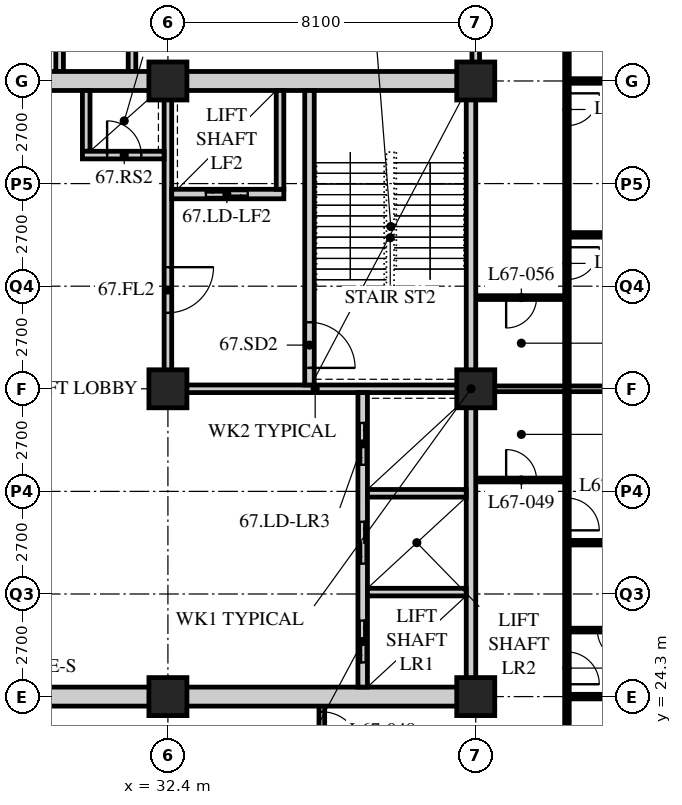
"""IFC4 building model, lengths in metres.
Left out: names, types, materials, properties, quantities, classifications, styles, units other than length and angle.
Written with IfcOpenShell. Run it as: python <this file> out.ifc"""

import sys

from ifc_helpers import new_model, si_unit, direction, frame, frame_2d, origin, origin_2d, place, context, subcontext, project, spatial, rectangle, hollow_rectangle, extrude, element, fill, save


model = new_model("IFC4")
c1 = context("Model", 3, precision=1e-05, world=origin(), true_north=direction((0.0, 1.0)))
c2 = subcontext(c1, "Body", "Model", "MODEL_VIEW")
j1 = project(units=[si_unit("LENGTHUNIT", "METRE"), si_unit("PLANEANGLEUNIT", "RADIAN")], contexts=[c1])
p1 = place(None, origin())
s1 = spatial("IfcSite", under=j1, at=p1, CompositionType="ELEMENT")
p2 = place(p1, origin())
s2 = spatial("IfcBuilding", under=s1, at=p2, CompositionType="ELEMENT")
p3 = place(p2, frame((0.0, 0.0, 261.9)))
s3 = spatial("IfcBuildingStorey", under=s2, at=p3, CompositionType="ELEMENT", Elevation=261.9)
for number, where, z_axis, x_axis in (
    (1, (32.4, 24.3, 0.0), (0.0, 0.0, 1.0), (1.0, 0.0, 0.0)),
    (2, (32.4, 32.4, 0.0), (0.0, 0.0, 1.0), (1.0, 0.0, 0.0)),
    (3, (32.4, 40.5, 0.0), (0.0, 0.0, 1.0), (1.0, 0.0, 0.0)),
    (4, (40.5, 24.3, 0.0), (0.0, 0.0, 1.0), (1.0, 0.0, 0.0)),
    (5, (40.5, 32.4, 0.0), (0.0, 0.0, 1.0), (1.0, 0.0, 0.0)),
    (6, (40.5, 40.5, 0.0), (0.0, 0.0, 1.0), (1.0, 0.0, 0.0)),
):
    element("IfcColumn", number, at=place(p3, frame(where, z_axis=z_axis, x_axis=x_axis)), inside=s3, PredefinedType="COLUMN", context=c2, shape_type="SweptSolid", body=[
        extrude(hollow_rectangle(XDim=1.0, YDim=1.0, WallThickness=0.1, at=origin_2d()), origin(), (0.0, 0.0, 1.0), 3.9),
    ])
for number, where, z_axis, x_axis in (
    (7, (31.455, 46.8, 0.0), (0.0, 0.0, 1.0), (0.0, -1.0, 0.0)),
    (8, (29.55, 40.5, 0.0), (0.0, 0.0, 1.0), (0.0, 1.0, 0.0)),
):
    element("IfcWall", number, at=place(p3, frame(where, z_axis=z_axis, x_axis=x_axis)), inside=s3, PredefinedType="SOLIDWALL", context=c2, shape_type="SweptSolid", body=[
        extrude(rectangle(XDim=6.3, YDim=0.2, at=frame_2d((3.15, 0.0))), origin(), (0.0, 0.0, 1.0), 3.69),
    ])
p4 = place(p3, frame((36.45, 22.5, 0.0), z_axis=(0.0, 0.0, 1.0), x_axis=(0.0, 1.0, 0.0)))
e9 = element("IfcWall", 9, at=p4, inside=s3, PredefinedType="PARTITIONING", context=c2, shape_type="SweptSolid", body=[
    extrude(rectangle(XDim=1.8, YDim=0.15, at=frame_2d((0.9, 0.0))), origin(), (0.0, 0.0, 1.0), 3.69),
])
p5 = place(p4, frame((0.4, 0.0, 0.0)))
e10 = element("IfcOpeningElement", 10, at=p5, cuts=e9, PredefinedType="OPENING", context=c2, shape_type="SweptSolid", body=[
    extrude(rectangle(XDim=1.0, YDim=2.1, at=frame_2d((0.5, 1.05))), frame((0.0, 0.085, 0.0), z_axis=(0.0, -1.0, 0.0), x_axis=(1.0, 0.0, 0.0)), (0.0, 0.0, 1.0), 0.17),
])
p6 = place(p3, frame((40.5, 40.5, 0.0), z_axis=(0.0, 0.0, 1.0), x_axis=(0.0, 1.0, 0.0)))
e11 = element("IfcWall", 11, at=p6, inside=s3, PredefinedType="SOLIDWALL", context=c2, shape_type="SweptSolid", body=[
    extrude(rectangle(XDim=6.3, YDim=0.2, at=frame_2d((3.15, 0.0))), origin(), (0.0, 0.0, 1.0), 3.078),
])
p7 = place(p3, frame((40.5, 30.0, 0.0), z_axis=(0.0, 0.0, 1.0), x_axis=(1.0, 0.0, 0.0)))
e12 = element("IfcWall", 12, at=p7, inside=s3, PredefinedType="PARTITIONING", context=c2, shape_type="SweptSolid", body=[
    extrude(rectangle(XDim=2.4, YDim=0.1, at=frame_2d((1.2, 0.0))), origin(), (0.0, 0.0, 1.0), 3.69),
])
p8 = place(p7, frame((0.8, 0.0, 0.0)))
e13 = element("IfcOpeningElement", 13, at=p8, cuts=e12, PredefinedType="OPENING", context=c2, shape_type="SweptSolid", body=[
    extrude(rectangle(XDim=0.8, YDim=2.1, at=frame_2d((0.4, 1.05))), frame((0.0, 0.06, 0.0), z_axis=(0.0, -1.0, 0.0), x_axis=(1.0, 0.0, 0.0)), (0.0, 0.0, 1.0), 0.12),
])
p9 = place(p3, frame((42.9, 22.5, 0.0), z_axis=(0.0, 0.0, 1.0), x_axis=(0.0, 1.0, 0.0)))
e14 = element("IfcWall", 14, at=p9, inside=s3, PredefinedType="PARTITIONING", context=c2, shape_type="SweptSolid", body=[
    extrude(rectangle(XDim=9.9, YDim=0.12, at=frame_2d((4.95, 0.0))), origin(), (0.0, 0.0, 1.0), 3.69),
])
p10 = place(p9, frame((2.125, 0.0, 0.0)))
e15 = element("IfcOpeningElement", 15, at=p10, cuts=e14, PredefinedType="OPENING", context=c2, shape_type="SweptSolid", body=[
    extrude(rectangle(XDim=0.85, YDim=2.1, at=frame_2d((0.425, 1.05))), frame((0.0, 0.07, 0.0), z_axis=(0.0, -1.0, 0.0), x_axis=(1.0, 0.0, 0.0)), (0.0, 0.0, 1.0), 0.14),
])
p11 = place(p9, frame((6.175, 0.0, 0.0)))
e16 = element("IfcOpeningElement", 16, at=p11, cuts=e14, PredefinedType="OPENING", context=c2, shape_type="SweptSolid", body=[
    extrude(rectangle(XDim=0.85, YDim=2.1, at=frame_2d((0.425, 1.05))), frame((0.0, 0.07, 0.0), z_axis=(0.0, -1.0, 0.0), x_axis=(1.0, 0.0, 0.0)), (0.0, 0.0, 1.0), 0.14),
])
p12 = place(p3, frame((42.9, 24.3, 0.0), z_axis=(0.0, 0.0, 1.0), x_axis=(1.0, 0.0, 0.0)))
e17 = element("IfcWall", 17, at=p12, inside=s3, PredefinedType="PARTITIONING", context=c2, shape_type="SweptSolid", body=[
    extrude(rectangle(XDim=9.45, YDim=0.12, at=frame_2d((4.725, 0.0))), origin(), (0.0, 0.0, 1.0), 3.078),
])
p13 = place(p3, frame((40.5, 32.4, 0.0), z_axis=(0.0, 0.0, 1.0), x_axis=(1.0, 0.0, 0.0)))
e18 = element("IfcWall", 18, at=p13, inside=s3, PredefinedType="PARTITIONING", context=c2, shape_type="SweptSolid", body=[
    extrude(rectangle(XDim=15.9, YDim=0.15, at=frame_2d((7.95, 0.0))), origin(), (0.0, 0.0, 1.0), 3.078),
])
p14 = place(p3, frame((42.9, 26.05, 0.0), z_axis=(0.0, 0.0, 1.0), x_axis=(1.0, 0.0, 0.0)))
e19 = element("IfcWall", 19, at=p14, inside=s3, PredefinedType="PARTITIONING", context=c2, shape_type="SweptSolid", body=[
    extrude(rectangle(XDim=2.4, YDim=0.1, at=frame_2d((1.2, 0.0))), origin(), (0.0, 0.0, 1.0), 3.69),
])
p15 = place(p14, frame((0.8, 0.0, 0.0)))
e20 = element("IfcOpeningElement", 20, at=p15, cuts=e19, PredefinedType="OPENING", context=c2, shape_type="SweptSolid", body=[
    extrude(rectangle(XDim=0.8, YDim=2.1, at=frame_2d((0.4, 1.05))), frame((0.0, 0.06, 0.0), z_axis=(0.0, -1.0, 0.0), x_axis=(1.0, 0.0, 0.0)), (0.0, 0.0, 1.0), 0.12),
])
p16 = place(p3, frame((42.9, 28.35, 0.0), z_axis=(0.0, 0.0, 1.0), x_axis=(1.0, 0.0, 0.0)))
e21 = element("IfcWall", 21, at=p16, inside=s3, PredefinedType="PARTITIONING", context=c2, shape_type="SweptSolid", body=[
    extrude(rectangle(XDim=13.5, YDim=0.12, at=frame_2d((6.75, 0.0))), origin(), (0.0, 0.0, 1.0), 3.69),
])
p17 = place(p3, frame((40.5, 34.8, 0.0), z_axis=(0.0, 0.0, 1.0), x_axis=(1.0, 0.0, 0.0)))
e22 = element("IfcWall", 22, at=p17, inside=s3, PredefinedType="PARTITIONING", context=c2, shape_type="SweptSolid", body=[
    extrude(rectangle(XDim=2.4, YDim=0.1, at=frame_2d((1.2, 0.0))), origin(), (0.0, 0.0, 1.0), 3.69),
])
p18 = place(p17, frame((0.8, 0.0, 0.0)))
e23 = element("IfcOpeningElement", 23, at=p18, cuts=e22, PredefinedType="OPENING", context=c2, shape_type="SweptSolid", body=[
    extrude(rectangle(XDim=0.8, YDim=2.1, at=frame_2d((0.4, 1.05))), frame((0.0, 0.06, 0.0), z_axis=(0.0, -1.0, 0.0), x_axis=(1.0, 0.0, 0.0)), (0.0, 0.0, 1.0), 0.12),
])
p19 = place(p3, frame((42.9, 48.6, 0.0), z_axis=(0.0, 0.0, 1.0), x_axis=(0.0, -1.0, 0.0)))
e24 = element("IfcWall", 24, at=p19, inside=s3, PredefinedType="PARTITIONING", context=c2, shape_type="SweptSolid", body=[
    extrude(rectangle(XDim=16.2, YDim=0.12, at=frame_2d((8.1, 0.0))), origin(), (0.0, 0.0, 1.0), 3.69),
])
p20 = place(p19, frame((2.125, 0.0, 0.0)))
e25 = element("IfcOpeningElement", 25, at=p20, cuts=e24, PredefinedType="OPENING", context=c2, shape_type="SweptSolid", body=[
    extrude(rectangle(XDim=0.85, YDim=2.1, at=frame_2d((0.425, 1.05))), frame((0.0, 0.07, 0.0), z_axis=(0.0, -1.0, 0.0), x_axis=(1.0, 0.0, 0.0)), (0.0, 0.0, 1.0), 0.14),
])
p21 = place(p19, frame((8.425, 0.0, 0.0)))
e26 = element("IfcOpeningElement", 26, at=p21, cuts=e24, PredefinedType="OPENING", context=c2, shape_type="SweptSolid", body=[
    extrude(rectangle(XDim=0.85, YDim=2.1, at=frame_2d((0.425, 1.05))), frame((0.0, 0.07, 0.0), z_axis=(0.0, -1.0, 0.0), x_axis=(1.0, 0.0, 0.0)), (0.0, 0.0, 1.0), 0.14),
])
p22 = place(p19, frame((12.475, 0.0, 0.0)))
e27 = element("IfcOpeningElement", 27, at=p22, cuts=e24, PredefinedType="OPENING", context=c2, shape_type="SweptSolid", body=[
    extrude(rectangle(XDim=0.85, YDim=2.1, at=frame_2d((0.425, 1.05))), frame((0.0, 0.07, 0.0), z_axis=(0.0, -1.0, 0.0), x_axis=(1.0, 0.0, 0.0)), (0.0, 0.0, 1.0), 0.14),
])
p23 = place(p3, frame((42.9, 40.5, 0.0), z_axis=(0.0, 0.0, 1.0), x_axis=(1.0, 0.0, 0.0)))
e28 = element("IfcWall", 28, at=p23, inside=s3, PredefinedType="PARTITIONING", context=c2, shape_type="SweptSolid", body=[
    extrude(rectangle(XDim=13.5, YDim=0.12, at=frame_2d((6.75, 0.0))), origin(), (0.0, 0.0, 1.0), 3.078),
])
p24 = place(p3, frame((42.9, 36.45, 0.0), z_axis=(0.0, 0.0, 1.0), x_axis=(1.0, 0.0, 0.0)))
e29 = element("IfcWall", 29, at=p24, inside=s3, PredefinedType="PARTITIONING", context=c2, shape_type="SweptSolid", body=[
    extrude(rectangle(XDim=13.5, YDim=0.12, at=frame_2d((6.75, 0.0))), origin(), (0.0, 0.0, 1.0), 3.69),
])
p25 = place(p3, frame((15.95, 24.3, 0.0), z_axis=(0.0, 0.0, 1.0), x_axis=(1.0, 0.0, 0.0)))
e30 = element("IfcWall", 30, at=p25, inside=s3, PredefinedType="SOLIDWALL", context=c2, shape_type="SweptSolid", body=[
    extrude(rectangle(XDim=24.55, YDim=0.5, at=frame_2d((12.275, 0.0))), origin(), (0.0, 0.0, 1.0), 3.04),
])
p26 = place(p25, frame((11.5, 0.0, 0.0)))
e31 = element("IfcOpeningElement", 31, at=p26, cuts=e30, PredefinedType="OPENING", context=c2, shape_type="SweptSolid", body=[
    extrude(rectangle(XDim=1.8, YDim=2.4, at=frame_2d((0.9, 1.2))), frame((0.0, 0.26, 0.0), z_axis=(0.0, -1.0, 0.0), x_axis=(1.0, 0.0, 0.0)), (0.0, 0.0, 1.0), 0.52),
])
p27 = place(p3, frame((15.95, 40.5, 0.0), z_axis=(0.0, 0.0, 1.0), x_axis=(1.0, 0.0, 0.0)))
e32 = element("IfcWall", 32, at=p27, inside=s3, PredefinedType="SOLIDWALL", context=c2, shape_type="SweptSolid", body=[
    extrude(rectangle(XDim=24.55, YDim=0.5, at=frame_2d((12.275, 0.0))), origin(), (0.0, 0.0, 1.0), 3.04),
])
p28 = place(p27, frame((11.5, 0.0, 0.0)))
e33 = element("IfcOpeningElement", 33, at=p28, cuts=e32, PredefinedType="OPENING", context=c2, shape_type="SweptSolid", body=[
    extrude(rectangle(XDim=1.8, YDim=2.4, at=frame_2d((0.9, 1.2))), frame((0.0, 0.26, 0.0), z_axis=(0.0, -1.0, 0.0), x_axis=(1.0, 0.0, 0.0)), (0.0, 0.0, 1.0), 0.52),
])
p29 = place(p3, frame((40.375, 24.55, 0.0), z_axis=(0.0, 0.0, 1.0), x_axis=(0.0, 1.0, 0.0)))
e34 = element("IfcWall", 34, at=p29, inside=s3, PredefinedType="SOLIDWALL", context=c2, shape_type="SweptSolid", body=[
    extrude(rectangle(XDim=15.7, YDim=0.25, at=frame_2d((7.85, 0.0))), origin(), (0.0, 0.0, 1.0), 3.078),
])
p30 = place(p3, frame((32.3, 32.4, 0.0), z_axis=(0.0, 0.0, 1.0), x_axis=(1.0, 0.0, 0.0)))
e35 = element("IfcWall", 35, at=p30, inside=s3, PredefinedType="SOLIDWALL", context=c2, shape_type="SweptSolid", body=[
    extrude(rectangle(XDim=7.95, YDim=0.2, at=frame_2d((3.975, 0.0))), origin(), (0.0, 0.0, 1.0), 3.078),
])
p31 = place(p3, frame((32.4, 32.5, 0.0), z_axis=(0.0, 0.0, 1.0), x_axis=(0.0, 1.0, 0.0)))
e36 = element("IfcWall", 36, at=p31, inside=s3, PredefinedType="SOLIDWALL", context=c2, shape_type="SweptSolid", body=[
    extrude(rectangle(XDim=7.75, YDim=0.2, at=frame_2d((3.875, 0.0))), origin(), (0.0, 0.0, 1.0), 3.078),
])
p32 = place(p31, frame((1.9, 0.0, 0.0)))
e37 = element("IfcOpeningElement", 37, at=p32, cuts=e36, PredefinedType="OPENING", context=c2, shape_type="SweptSolid", body=[
    extrude(rectangle(XDim=1.2, YDim=2.1, at=frame_2d((0.6, 1.05))), frame((0.0, 0.11, 0.0), z_axis=(0.0, -1.0, 0.0), x_axis=(1.0, 0.0, 0.0)), (0.0, 0.0, 1.0), 0.22),
])
p33 = place(p3, frame((37.525, 24.55, 0.0), z_axis=(0.0, 0.0, 1.0), x_axis=(0.0, 1.0, 0.0)))
e38 = element("IfcWall", 38, at=p33, inside=s3, PredefinedType="SOLIDWALL", context=c2, shape_type="SweptSolid", body=[
    extrude(rectangle(XDim=7.75, YDim=0.25, at=frame_2d((3.875, 0.0))), origin(), (0.0, 0.0, 1.0), 3.69),
])
p34 = place(p33, frame((0.65, 0.0, 0.0)))
e39 = element("IfcOpeningElement", 39, at=p34, cuts=e38, PredefinedType="OPENING", context=c2, shape_type="SweptSolid", body=[
    extrude(rectangle(XDim=1.1, YDim=2.4, at=frame_2d((0.55, 1.2))), frame((0.0, 0.135, 0.0), z_axis=(0.0, -1.0, 0.0), x_axis=(1.0, 0.0, 0.0)), (0.0, 0.0, 1.0), 0.27),
])
p35 = place(p33, frame((3.25, 0.0, 0.0)))
e40 = element("IfcOpeningElement", 40, at=p35, cuts=e38, PredefinedType="OPENING", context=c2, shape_type="SweptSolid", body=[
    extrude(rectangle(XDim=1.1, YDim=2.4, at=frame_2d((0.55, 1.2))), frame((0.0, 0.135, 0.0), z_axis=(0.0, -1.0, 0.0), x_axis=(1.0, 0.0, 0.0)), (0.0, 0.0, 1.0), 0.27),
])
p36 = place(p33, frame((5.85, 0.0, 0.0)))
e41 = element("IfcOpeningElement", 41, at=p36, cuts=e38, PredefinedType="OPENING", context=c2, shape_type="SweptSolid", body=[
    extrude(rectangle(XDim=1.1, YDim=2.4, at=frame_2d((0.55, 1.2))), frame((0.0, 0.135, 0.0), z_axis=(0.0, -1.0, 0.0), x_axis=(1.0, 0.0, 0.0)), (0.0, 0.0, 1.0), 0.27),
])
for number, where, z_axis, x_axis in (
    (42, (37.65, 27.05, 0.0), (0.0, 0.0, 1.0), (1.0, 0.0, 0.0)),
    (43, (37.65, 29.65, 0.0), (0.0, 0.0, 1.0), (1.0, 0.0, 0.0)),
):
    element("IfcWall", number, at=place(p3, frame(where, z_axis=z_axis, x_axis=x_axis)), inside=s3, PredefinedType="SOLIDWALL", context=c2, shape_type="SweptSolid", body=[
        extrude(rectangle(XDim=2.6, YDim=0.2, at=frame_2d((1.3, 0.0))), origin(), (0.0, 0.0, 1.0), 3.69),
    ])
p37 = place(p3, frame((36.125, 32.5, 0.0), z_axis=(0.0, 0.0, 1.0), x_axis=(0.0, 1.0, 0.0)))
e44 = element("IfcWall", 44, at=p37, inside=s3, PredefinedType="SOLIDWALL", context=c2, shape_type="SweptSolid", body=[
    extrude(rectangle(XDim=7.75, YDim=0.25, at=frame_2d((3.875, 0.0))), origin(), (0.0, 0.0, 1.0), 3.69),
])
p38 = place(p37, frame((0.45, 0.0, 0.0)))
e45 = element("IfcOpeningElement", 45, at=p38, cuts=e44, PredefinedType="OPENING", context=c2, shape_type="SweptSolid", body=[
    extrude(rectangle(XDim=1.2, YDim=2.1, at=frame_2d((0.6, 1.05))), frame((0.0, 0.135, 0.0), z_axis=(0.0, -1.0, 0.0), x_axis=(1.0, 0.0, 0.0)), (0.0, 0.0, 1.0), 0.27),
])
p39 = place(p3, frame((32.5, 37.525, 0.0), z_axis=(0.0, 0.0, 1.0), x_axis=(1.0, 0.0, 0.0)))
e46 = element("IfcWall", 46, at=p39, inside=s3, PredefinedType="SOLIDWALL", context=c2, shape_type="SweptSolid", body=[
    extrude(rectangle(XDim=2.95, YDim=0.25, at=frame_2d((1.475, 0.0))), origin(), (0.0, 0.0, 1.0), 3.69),
])
p40 = place(p39, frame((0.9, 0.0, 0.0)))
e47 = element("IfcOpeningElement", 47, at=p40, cuts=e46, PredefinedType="OPENING", context=c2, shape_type="SweptSolid", body=[
    extrude(rectangle(XDim=1.1, YDim=2.4, at=frame_2d((0.55, 1.2))), frame((0.0, 0.135, 0.0), z_axis=(0.0, -1.0, 0.0), x_axis=(1.0, 0.0, 0.0)), (0.0, 0.0, 1.0), 0.27),
])
p41 = place(p3, frame((35.35, 37.65, 0.0), z_axis=(0.0, 0.0, 1.0), x_axis=(0.0, 1.0, 0.0)))
e48 = element("IfcWall", 48, at=p41, inside=s3, PredefinedType="SOLIDWALL", context=c2, shape_type="SweptSolid", body=[
    extrude(rectangle(XDim=2.6, YDim=0.2, at=frame_2d((1.3, 0.0))), origin(), (0.0, 0.0, 1.0), 3.69),
])
p42 = place(p3, frame((30.25, 38.65, 0.0), z_axis=(0.0, 0.0, 1.0), x_axis=(0.0, 1.0, 0.0)))
e49 = element("IfcWall", 49, at=p42, inside=s3, PredefinedType="SOLIDWALL", context=c2, shape_type="SweptSolid", body=[
    extrude(rectangle(XDim=1.6, YDim=0.2, at=frame_2d((0.8, 0.0))), origin(), (0.0, 0.0, 1.0), 3.69),
])
p43 = place(p3, frame((30.15, 38.55, 0.0), z_axis=(0.0, 0.0, 1.0), x_axis=(1.0, 0.0, 0.0)))
e50 = element("IfcWall", 50, at=p43, inside=s3, PredefinedType="SOLIDWALL", context=c2, shape_type="SweptSolid", body=[
    extrude(rectangle(XDim=2.15, YDim=0.2, at=frame_2d((1.075, 0.0))), origin(), (0.0, 0.0, 1.0), 3.69),
])
p44 = place(p43, frame((0.65, 0.0, 0.0)))
e51 = element("IfcOpeningElement", 51, at=p44, cuts=e50, PredefinedType="OPENING", context=c2, shape_type="SweptSolid", body=[
    extrude(rectangle(XDim=0.9, YDim=2.1, at=frame_2d((0.45, 1.05))), frame((0.0, 0.11, 0.0), z_axis=(0.0, -1.0, 0.0), x_axis=(1.0, 0.0, 0.0)), (0.0, 0.0, 1.0), 0.22),
])
p45 = place(p5, origin())
e52 = element("IfcDoor", 52, at=p45, inside=s3, OperationType="SINGLE_SWING_RIGHT", PredefinedType="DOOR", context=c2, shape_type="SweptSolid", body=[
    extrude(rectangle(XDim=1.0, YDim=2.1, at=frame_2d((0.5, 1.05))), frame((0.0, 0.025, 0.0), z_axis=(0.0, -1.0, 0.0), x_axis=(1.0, 0.0, 0.0)), (0.0, 0.0, 1.0), 0.05),
])
fill(e10, e52)
p46 = place(p8, origin())
e53 = element("IfcDoor", 53, at=p46, inside=s3, OperationType="SINGLE_SWING_LEFT", PredefinedType="DOOR", context=c2, shape_type="SweptSolid", body=[
    extrude(rectangle(XDim=0.8, YDim=2.1, at=frame_2d((0.4, 1.05))), frame((0.0, 0.025, 0.0), z_axis=(0.0, -1.0, 0.0), x_axis=(1.0, 0.0, 0.0)), (0.0, 0.0, 1.0), 0.05),
])
fill(e13, e53)
p47 = place(p15, origin())
e54 = element("IfcDoor", 54, at=p47, inside=s3, OperationType="SINGLE_SWING_LEFT", PredefinedType="DOOR", context=c2, shape_type="SweptSolid", body=[
    extrude(rectangle(XDim=0.8, YDim=2.1, at=frame_2d((0.4, 1.05))), frame((0.0, 0.025, 0.0), z_axis=(0.0, -1.0, 0.0), x_axis=(1.0, 0.0, 0.0)), (0.0, 0.0, 1.0), 0.05),
])
fill(e20, e54)
p48 = place(p10, origin())
e55 = element("IfcDoor", 55, at=p48, inside=s3, OperationType="SINGLE_SWING_RIGHT", PredefinedType="DOOR", context=c2, shape_type="SweptSolid", body=[
    extrude(rectangle(XDim=0.85, YDim=2.1, at=frame_2d((0.425, 1.05))), frame((0.0, 0.025, 0.0), z_axis=(0.0, -1.0, 0.0), x_axis=(1.0, 0.0, 0.0)), (0.0, 0.0, 1.0), 0.05),
])
fill(e15, e55)
p49 = place(p11, origin())
e56 = element("IfcDoor", 56, at=p49, inside=s3, OperationType="SINGLE_SWING_RIGHT", PredefinedType="DOOR", context=c2, shape_type="SweptSolid", body=[
    extrude(rectangle(XDim=0.85, YDim=2.1, at=frame_2d((0.425, 1.05))), frame((0.0, 0.025, 0.0), z_axis=(0.0, -1.0, 0.0), x_axis=(1.0, 0.0, 0.0)), (0.0, 0.0, 1.0), 0.05),
])
fill(e16, e56)
p50 = place(p18, origin())
e57 = element("IfcDoor", 57, at=p50, inside=s3, OperationType="SINGLE_SWING_RIGHT", PredefinedType="DOOR", context=c2, shape_type="SweptSolid", body=[
    extrude(rectangle(XDim=0.8, YDim=2.1, at=frame_2d((0.4, 1.05))), frame((0.0, 0.025, 0.0), z_axis=(0.0, -1.0, 0.0), x_axis=(1.0, 0.0, 0.0)), (0.0, 0.0, 1.0), 0.05),
])
fill(e23, e57)
p51 = place(p21, origin())
e58 = element("IfcDoor", 58, at=p51, inside=s3, OperationType="SINGLE_SWING_LEFT", PredefinedType="DOOR", context=c2, shape_type="SweptSolid", body=[
    extrude(rectangle(XDim=0.85, YDim=2.1, at=frame_2d((0.425, 1.05))), frame((0.0, 0.025, 0.0), z_axis=(0.0, -1.0, 0.0), x_axis=(1.0, 0.0, 0.0)), (0.0, 0.0, 1.0), 0.05),
])
fill(e26, e58)
p52 = place(p22, origin())
e59 = element("IfcDoor", 59, at=p52, inside=s3, OperationType="SINGLE_SWING_LEFT", PredefinedType="DOOR", context=c2, shape_type="SweptSolid", body=[
    extrude(rectangle(XDim=0.85, YDim=2.1, at=frame_2d((0.425, 1.05))), frame((0.0, 0.025, 0.0), z_axis=(0.0, -1.0, 0.0), x_axis=(1.0, 0.0, 0.0)), (0.0, 0.0, 1.0), 0.05),
])
fill(e27, e59)
p53 = place(p38, origin())
e60 = element("IfcDoor", 60, at=p53, inside=s3, OperationType="SINGLE_SWING_RIGHT", PredefinedType="DOOR", context=c2, shape_type="SweptSolid", body=[
    extrude(rectangle(XDim=1.2, YDim=2.1, at=frame_2d((0.6, 1.05))), frame((0.0, 0.025, 0.0), z_axis=(0.0, -1.0, 0.0), x_axis=(1.0, 0.0, 0.0)), (0.0, 0.0, 1.0), 0.05),
])
fill(e45, e60)
p54 = place(p32, origin())
e61 = element("IfcDoor", 61, at=p54, inside=s3, OperationType="SINGLE_SWING_LEFT", PredefinedType="DOOR", context=c2, shape_type="SweptSolid", body=[
    extrude(rectangle(XDim=1.2, YDim=2.1, at=frame_2d((0.6, 1.05))), frame((0.0, 0.025, 0.0), z_axis=(0.0, -1.0, 0.0), x_axis=(1.0, 0.0, 0.0)), (0.0, 0.0, 1.0), 0.05),
])
fill(e37, e61)
p55 = place(p44, origin())
e62 = element("IfcDoor", 62, at=p55, inside=s3, OperationType="SINGLE_SWING_LEFT", PredefinedType="DOOR", context=c2, shape_type="SweptSolid", body=[
    extrude(rectangle(XDim=0.9, YDim=2.1, at=frame_2d((0.45, 1.05))), frame((0.0, 0.025, 0.0), z_axis=(0.0, -1.0, 0.0), x_axis=(1.0, 0.0, 0.0)), (0.0, 0.0, 1.0), 0.05),
])
fill(e51, e62)
p56 = place(p34, origin())
e63 = element("IfcDoor", 63, at=p56, inside=s3, OperationType="DOUBLE_DOOR_SLIDING", PredefinedType="DOOR", context=c2, shape_type="SweptSolid", body=[
    extrude(rectangle(XDim=1.1, YDim=2.4, at=frame_2d((0.55, 1.2))), frame((0.0, 0.025, 0.0), z_axis=(0.0, -1.0, 0.0), x_axis=(1.0, 0.0, 0.0)), (0.0, 0.0, 1.0), 0.05),
])
fill(e39, e63)
p57 = place(p35, origin())
e64 = element("IfcDoor", 64, at=p57, inside=s3, OperationType="DOUBLE_DOOR_SLIDING", PredefinedType="DOOR", context=c2, shape_type="SweptSolid", body=[
    extrude(rectangle(XDim=1.1, YDim=2.4, at=frame_2d((0.55, 1.2))), frame((0.0, 0.025, 0.0), z_axis=(0.0, -1.0, 0.0), x_axis=(1.0, 0.0, 0.0)), (0.0, 0.0, 1.0), 0.05),
])
fill(e40, e64)
p58 = place(p36, origin())
e65 = element("IfcDoor", 65, at=p58, inside=s3, OperationType="DOUBLE_DOOR_SLIDING", PredefinedType="DOOR", context=c2, shape_type="SweptSolid", body=[
    extrude(rectangle(XDim=1.1, YDim=2.4, at=frame_2d((0.55, 1.2))), frame((0.0, 0.025, 0.0), z_axis=(0.0, -1.0, 0.0), x_axis=(1.0, 0.0, 0.0)), (0.0, 0.0, 1.0), 0.05),
])
fill(e41, e65)
p59 = place(p40, origin())
e66 = element("IfcDoor", 66, at=p59, inside=s3, OperationType="DOUBLE_DOOR_SLIDING", PredefinedType="DOOR", context=c2, shape_type="SweptSolid", body=[
    extrude(rectangle(XDim=1.1, YDim=2.4, at=frame_2d((0.55, 1.2))), frame((0.0, 0.025, 0.0), z_axis=(0.0, -1.0, 0.0), x_axis=(1.0, 0.0, 0.0)), (0.0, 0.0, 1.0), 0.05),
])
fill(e47, e66)
save(model, sys.argv[1])
